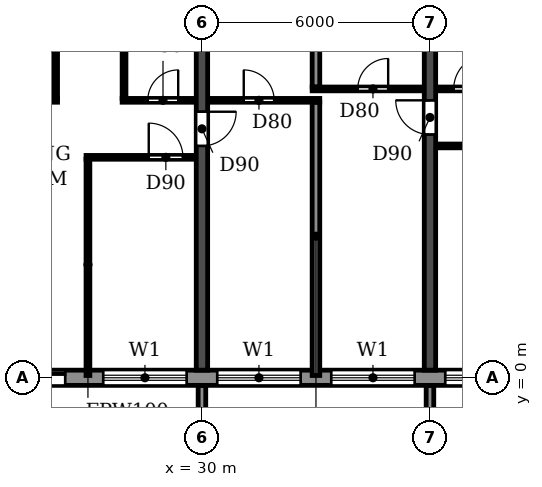
"""IFC4 building model, lengths in metres.
Left out: names, types, materials, properties, quantities, classifications, styles, units other than length and angle.
Written with IfcOpenShell. Run it as: python <this file> out.ifc"""

import sys

from ifc_helpers import new_model, si_unit, direction, frame, frame_2d, origin, place, context, subcontext, project, spatial, polyline, rectangle, outline, extrude, source, transform, mapped, element, fill, save


model = new_model("IFC4")
c1 = context("Model", 3, precision=1e-05, world=origin(), true_north=direction((0.0, 1.0)))
c2 = subcontext(c1, "Body", "Model", "MODEL_VIEW")
j1 = project(units=[si_unit("LENGTHUNIT", "METRE"), si_unit("PLANEANGLEUNIT", "RADIAN")], contexts=[c1])
p1 = place(None, origin())
s1 = spatial("IfcSite", under=j1, at=p1, CompositionType="ELEMENT")
p2 = place(p1, origin())
s2 = spatial("IfcBuilding", under=s1, at=p2, CompositionType="ELEMENT")
p3 = place(p2, frame((0.0, 0.0, 155.4)))
s3 = spatial("IfcBuildingStorey", under=s2, at=p3, CompositionType="ELEMENT", Elevation=155.4)
p4 = place(p3, frame((30.0, 0.2, 0.0), z_axis=(0.0, 0.0, 1.0), x_axis=(0.0, 1.0, 0.0)))
e1 = element("IfcWall", 1, at=p4, inside=s3, PredefinedType="SHEAR", context=c2, shape_type="SweptSolid", body=[
    extrude(rectangle(XDim=11.675, YDim=0.3, at=frame_2d((5.837, 0.0))), origin(), (0.0, 0.0, 1.0), 3.0),
])
p5 = place(p4, frame((5.9, 0.0, 0.0)))
e2 = element("IfcOpeningElement", 2, at=p5, cuts=e1, PredefinedType="OPENING", context=c2, shape_type="SweptSolid", body=[
    extrude(rectangle(XDim=0.9, YDim=2.1, at=frame_2d((0.45, 1.05))), frame((0.0, 0.16, 0.0), z_axis=(0.0, -1.0, 0.0), x_axis=(1.0, 0.0, 0.0)), (0.0, 0.0, 1.0), 0.32),
])
p6 = place(p3, frame((36.0, 0.2, 0.0), z_axis=(0.0, 0.0, 1.0), x_axis=(0.0, 1.0, 0.0)))
e3 = element("IfcWall", 3, at=p6, inside=s3, PredefinedType="SHEAR", context=c2, shape_type="SweptSolid", body=[
    extrude(rectangle(XDim=11.675, YDim=0.3, at=frame_2d((5.837, 0.0))), origin(), (0.0, 0.0, 1.0), 3.0),
])
p7 = place(p6, frame((6.2, 0.0, 0.0)))
e4 = element("IfcOpeningElement", 4, at=p7, cuts=e3, PredefinedType="OPENING", context=c2, shape_type="SweptSolid", body=[
    extrude(rectangle(XDim=0.9, YDim=2.1, at=frame_2d((0.45, 1.05))), frame((0.0, 0.16, 0.0), z_axis=(0.0, -1.0, 0.0), x_axis=(1.0, 0.0, 0.0)), (0.0, 0.0, 1.0), 0.32),
])
p8 = place(p3, frame((16.683, 0.0, 0.0), z_axis=(0.0, 0.0, 1.0), x_axis=(1.0, 0.0, 0.0)))
e5 = element("IfcWall", 5, at=p8, inside=s3, PredefinedType="STANDARD", context=c2, shape_type="SweptSolid", body=[
    extrude(rectangle(XDim=68.634, YDim=0.4, at=frame_2d((34.317, 0.0))), origin(), (0.0, 0.0, 1.0), 3.0),
])
p9 = place(p8, frame((1.717, 0.0, 0.9)))
e6 = element("IfcOpeningElement", 6, at=p9, cuts=e5, PredefinedType="OPENING", context=c2, shape_type="SweptSolid", body=[
    extrude(rectangle(XDim=2.2, YDim=1.5, at=frame_2d((1.1, 0.75))), frame((0.0, 0.21, 0.0), z_axis=(0.0, -1.0, 0.0), x_axis=(1.0, 0.0, 0.0)), (0.0, 0.0, 1.0), 0.42),
])
p10 = place(p8, frame((4.717, 0.0, 0.9)))
e7 = element("IfcOpeningElement", 7, at=p10, cuts=e5, PredefinedType="OPENING", context=c2, shape_type="SweptSolid", body=[
    extrude(rectangle(XDim=2.2, YDim=1.5, at=frame_2d((1.1, 0.75))), frame((0.0, 0.21, 0.0), z_axis=(0.0, -1.0, 0.0), x_axis=(1.0, 0.0, 0.0)), (0.0, 0.0, 1.0), 0.42),
])
p11 = place(p8, frame((7.917, 0.0, 0.0)))
e8 = element("IfcOpeningElement", 8, at=p11, cuts=e5, PredefinedType="OPENING", context=c2, shape_type="SweptSolid", body=[
    extrude(rectangle(XDim=1.8, YDim=2.4, at=frame_2d((0.9, 1.2))), frame((0.0, 0.21, 0.0), z_axis=(0.0, -1.0, 0.0), x_axis=(1.0, 0.0, 0.0)), (0.0, 0.0, 1.0), 0.42),
])
p12 = place(p8, frame((10.717, 0.0, 0.9)))
e9 = element("IfcOpeningElement", 9, at=p12, cuts=e5, PredefinedType="OPENING", context=c2, shape_type="SweptSolid", body=[
    extrude(rectangle(XDim=2.2, YDim=1.5, at=frame_2d((1.1, 0.75))), frame((0.0, 0.21, 0.0), z_axis=(0.0, -1.0, 0.0), x_axis=(1.0, 0.0, 0.0)), (0.0, 0.0, 1.0), 0.42),
])
p13 = place(p8, frame((13.717, 0.0, 0.9)))
e10 = element("IfcOpeningElement", 10, at=p13, cuts=e5, PredefinedType="OPENING", context=c2, shape_type="SweptSolid", body=[
    extrude(rectangle(XDim=2.2, YDim=1.5, at=frame_2d((1.1, 0.75))), frame((0.0, 0.21, 0.0), z_axis=(0.0, -1.0, 0.0), x_axis=(1.0, 0.0, 0.0)), (0.0, 0.0, 1.0), 0.42),
])
p14 = place(p8, frame((16.717, 0.0, 0.9)))
e11 = element("IfcOpeningElement", 11, at=p14, cuts=e5, PredefinedType="OPENING", context=c2, shape_type="SweptSolid", body=[
    extrude(rectangle(XDim=2.2, YDim=1.5, at=frame_2d((1.1, 0.75))), frame((0.0, 0.21, 0.0), z_axis=(0.0, -1.0, 0.0), x_axis=(1.0, 0.0, 0.0)), (0.0, 0.0, 1.0), 0.42),
])
p15 = place(p8, frame((19.717, 0.0, 0.9)))
e12 = element("IfcOpeningElement", 12, at=p15, cuts=e5, PredefinedType="OPENING", context=c2, shape_type="SweptSolid", body=[
    extrude(rectangle(XDim=2.2, YDim=1.5, at=frame_2d((1.1, 0.75))), frame((0.0, 0.21, 0.0), z_axis=(0.0, -1.0, 0.0), x_axis=(1.0, 0.0, 0.0)), (0.0, 0.0, 1.0), 0.42),
])
p16 = place(p8, frame((22.917, 0.0, 0.0)))
e13 = element("IfcOpeningElement", 13, at=p16, cuts=e5, PredefinedType="OPENING", context=c2, shape_type="SweptSolid", body=[
    extrude(rectangle(XDim=1.8, YDim=2.4, at=frame_2d((0.9, 1.2))), frame((0.0, 0.21, 0.0), z_axis=(0.0, -1.0, 0.0), x_axis=(1.0, 0.0, 0.0)), (0.0, 0.0, 1.0), 0.42),
])
p17 = place(p8, frame((25.717, 0.0, 0.9)))
e14 = element("IfcOpeningElement", 14, at=p17, cuts=e5, PredefinedType="OPENING", context=c2, shape_type="SweptSolid", body=[
    extrude(rectangle(XDim=2.2, YDim=1.5, at=frame_2d((1.1, 0.75))), frame((0.0, 0.21, 0.0), z_axis=(0.0, -1.0, 0.0), x_axis=(1.0, 0.0, 0.0)), (0.0, 0.0, 1.0), 0.42),
])
p18 = place(p8, frame((28.717, 0.0, 0.9)))
e15 = element("IfcOpeningElement", 15, at=p18, cuts=e5, PredefinedType="OPENING", context=c2, shape_type="SweptSolid", body=[
    extrude(rectangle(XDim=2.2, YDim=1.5, at=frame_2d((1.1, 0.75))), frame((0.0, 0.21, 0.0), z_axis=(0.0, -1.0, 0.0), x_axis=(1.0, 0.0, 0.0)), (0.0, 0.0, 1.0), 0.42),
])
p19 = place(p8, frame((31.917, 0.0, 0.0)))
e16 = element("IfcOpeningElement", 16, at=p19, cuts=e5, PredefinedType="OPENING", context=c2, shape_type="SweptSolid", body=[
    extrude(rectangle(XDim=1.8, YDim=2.4, at=frame_2d((0.9, 1.2))), frame((0.0, 0.21, 0.0), z_axis=(0.0, -1.0, 0.0), x_axis=(1.0, 0.0, 0.0)), (0.0, 0.0, 1.0), 0.42),
])
p20 = place(p8, frame((34.717, 0.0, 0.9)))
e17 = element("IfcOpeningElement", 17, at=p20, cuts=e5, PredefinedType="OPENING", context=c2, shape_type="SweptSolid", body=[
    extrude(rectangle(XDim=2.2, YDim=1.5, at=frame_2d((1.1, 0.75))), frame((0.0, 0.21, 0.0), z_axis=(0.0, -1.0, 0.0), x_axis=(1.0, 0.0, 0.0)), (0.0, 0.0, 1.0), 0.42),
])
p21 = place(p8, frame((37.717, 0.0, 0.9)))
e18 = element("IfcOpeningElement", 18, at=p21, cuts=e5, PredefinedType="OPENING", context=c2, shape_type="SweptSolid", body=[
    extrude(rectangle(XDim=2.2, YDim=1.5, at=frame_2d((1.1, 0.75))), frame((0.0, 0.21, 0.0), z_axis=(0.0, -1.0, 0.0), x_axis=(1.0, 0.0, 0.0)), (0.0, 0.0, 1.0), 0.42),
])
p22 = place(p8, frame((40.717, 0.0, 0.9)))
e19 = element("IfcOpeningElement", 19, at=p22, cuts=e5, PredefinedType="OPENING", context=c2, shape_type="SweptSolid", body=[
    extrude(rectangle(XDim=2.2, YDim=1.5, at=frame_2d((1.1, 0.75))), frame((0.0, 0.21, 0.0), z_axis=(0.0, -1.0, 0.0), x_axis=(1.0, 0.0, 0.0)), (0.0, 0.0, 1.0), 0.42),
])
p23 = place(p8, frame((43.717, 0.0, 0.9)))
e20 = element("IfcOpeningElement", 20, at=p23, cuts=e5, PredefinedType="OPENING", context=c2, shape_type="SweptSolid", body=[
    extrude(rectangle(XDim=2.2, YDim=1.5, at=frame_2d((1.1, 0.75))), frame((0.0, 0.21, 0.0), z_axis=(0.0, -1.0, 0.0), x_axis=(1.0, 0.0, 0.0)), (0.0, 0.0, 1.0), 0.42),
])
p24 = place(p8, frame((46.917, 0.0, 0.0)))
e21 = element("IfcOpeningElement", 21, at=p24, cuts=e5, PredefinedType="OPENING", context=c2, shape_type="SweptSolid", body=[
    extrude(rectangle(XDim=1.8, YDim=2.4, at=frame_2d((0.9, 1.2))), frame((0.0, 0.21, 0.0), z_axis=(0.0, -1.0, 0.0), x_axis=(1.0, 0.0, 0.0)), (0.0, 0.0, 1.0), 0.42),
])
p25 = place(p8, frame((49.717, 0.0, 0.9)))
e22 = element("IfcOpeningElement", 22, at=p25, cuts=e5, PredefinedType="OPENING", context=c2, shape_type="SweptSolid", body=[
    extrude(rectangle(XDim=2.2, YDim=1.5, at=frame_2d((1.1, 0.75))), frame((0.0, 0.21, 0.0), z_axis=(0.0, -1.0, 0.0), x_axis=(1.0, 0.0, 0.0)), (0.0, 0.0, 1.0), 0.42),
])
p26 = place(p8, frame((52.717, 0.0, 0.9)))
e23 = element("IfcOpeningElement", 23, at=p26, cuts=e5, PredefinedType="OPENING", context=c2, shape_type="SweptSolid", body=[
    extrude(rectangle(XDim=2.2, YDim=1.5, at=frame_2d((1.1, 0.75))), frame((0.0, 0.21, 0.0), z_axis=(0.0, -1.0, 0.0), x_axis=(1.0, 0.0, 0.0)), (0.0, 0.0, 1.0), 0.42),
])
p27 = place(p8, frame((55.717, 0.0, 0.9)))
e24 = element("IfcOpeningElement", 24, at=p27, cuts=e5, PredefinedType="OPENING", context=c2, shape_type="SweptSolid", body=[
    extrude(rectangle(XDim=2.2, YDim=1.5, at=frame_2d((1.1, 0.75))), frame((0.0, 0.21, 0.0), z_axis=(0.0, -1.0, 0.0), x_axis=(1.0, 0.0, 0.0)), (0.0, 0.0, 1.0), 0.42),
])
p28 = place(p8, frame((58.917, 0.0, 0.0)))
e25 = element("IfcOpeningElement", 25, at=p28, cuts=e5, PredefinedType="OPENING", context=c2, shape_type="SweptSolid", body=[
    extrude(rectangle(XDim=1.8, YDim=2.4, at=frame_2d((0.9, 1.2))), frame((0.0, 0.21, 0.0), z_axis=(0.0, -1.0, 0.0), x_axis=(1.0, 0.0, 0.0)), (0.0, 0.0, 1.0), 0.42),
])
p29 = place(p8, frame((61.717, 0.0, 0.9)))
e26 = element("IfcOpeningElement", 26, at=p29, cuts=e5, PredefinedType="OPENING", context=c2, shape_type="SweptSolid", body=[
    extrude(rectangle(XDim=2.2, YDim=1.5, at=frame_2d((1.1, 0.75))), frame((0.0, 0.21, 0.0), z_axis=(0.0, -1.0, 0.0), x_axis=(1.0, 0.0, 0.0)), (0.0, 0.0, 1.0), 0.42),
])
p30 = place(p8, frame((64.717, 0.0, 0.9)))
e27 = element("IfcOpeningElement", 27, at=p30, cuts=e5, PredefinedType="OPENING", context=c2, shape_type="SweptSolid", body=[
    extrude(rectangle(XDim=2.2, YDim=1.5, at=frame_2d((1.1, 0.75))), frame((0.0, 0.21, 0.0), z_axis=(0.0, -1.0, 0.0), x_axis=(1.0, 0.0, 0.0)), (0.0, 0.0, 1.0), 0.42),
])
m1 = source(origin(), c2, "Body", "SweptSolid", [
    extrude(outline(polyline([(0.0, 0.0), (0.2, 0.0), (0.2, 1.65), (0.0, 1.65), (0.0, 0.0)])), origin(), (0.0, 0.0, 1.0), 3.1),
])
for number, where in (
    (28, (29.9, -1.85, 0.0)),
    (29, (35.9, -1.85, 0.0)),
):
    element("IfcWall", number, at=place(p3, frame(where)), inside=s3, PredefinedType="STANDARD", context=c2, shape_type="MappedRepresentation", body=[
        mapped(m1, transform((0.0, 0.0, 0.0))),
    ])
p31 = place(p3, frame((33.0, 0.06, 0.0), z_axis=(0.0, 0.0, 1.0), x_axis=(0.0, 1.0, 0.0)))
e30 = element("IfcWall", 30, at=p31, inside=s3, PredefinedType="PARTITIONING", context=c2, shape_type="SweptSolid", body=[
    extrude(rectangle(XDim=7.19, YDim=0.2, at=frame_2d((3.595, 0.0))), origin(), (0.0, 0.0, 1.0), 3.0),
])
p32 = place(p3, frame((33.0, 7.65, 0.0), z_axis=(0.0, 0.0, 1.0), x_axis=(0.0, 1.0, 0.0)))
e31 = element("IfcWall", 31, at=p32, inside=s3, PredefinedType="PARTITIONING", context=c2, shape_type="SweptSolid", body=[
    extrude(rectangle(XDim=4.215, YDim=0.2, at=frame_2d((2.107, 0.0))), origin(), (0.0, 0.0, 1.0), 3.0),
])
p33 = place(p3, frame((26.95, 5.8, 0.0), z_axis=(0.0, 0.0, 1.0), x_axis=(1.0, 0.0, 0.0)))
e32 = element("IfcWall", 32, at=p33, inside=s3, PredefinedType="PARTITIONING", context=c2, shape_type="SweptSolid", body=[
    extrude(rectangle(XDim=2.89, YDim=0.1, at=frame_2d((1.445, 0.0))), origin(), (0.0, 0.0, 1.0), 3.0),
])
p34 = place(p33, frame((1.65, 0.0, 0.0)))
e33 = element("IfcOpeningElement", 33, at=p34, cuts=e32, PredefinedType="OPENING", context=c2, shape_type="SweptSolid", body=[
    extrude(rectangle(XDim=0.9, YDim=2.1, at=frame_2d((0.45, 1.05))), frame((0.0, 0.06, 0.0), z_axis=(0.0, -1.0, 0.0), x_axis=(1.0, 0.0, 0.0)), (0.0, 0.0, 1.0), 0.12),
])
p35 = place(p3, frame((36.16, 6.1, 0.0), z_axis=(0.0, 0.0, 1.0), x_axis=(1.0, 0.0, 0.0)))
e34 = element("IfcWall", 34, at=p35, inside=s3, PredefinedType="PARTITIONING", context=c2, shape_type="SweptSolid", body=[
    extrude(rectangle(XDim=2.89, YDim=0.1, at=frame_2d((1.445, 0.0))), origin(), (0.0, 0.0, 1.0), 3.0),
])
p36 = place(p35, frame((1.44, 0.0, 0.0)))
e35 = element("IfcOpeningElement", 35, at=p36, cuts=e34, PredefinedType="OPENING", context=c2, shape_type="SweptSolid", body=[
    extrude(rectangle(XDim=0.9, YDim=2.1, at=frame_2d((0.45, 1.05))), frame((0.0, 0.06, 0.0), z_axis=(0.0, -1.0, 0.0), x_axis=(1.0, 0.0, 0.0)), (0.0, 0.0, 1.0), 0.12),
])
p37 = place(p3, frame((24.16, 7.3, 0.0), z_axis=(0.0, 0.0, 1.0), x_axis=(1.0, 0.0, 0.0)))
e36 = element("IfcWall", 36, at=p37, inside=s3, PredefinedType="PARTITIONING", context=c2, shape_type="SweptSolid", body=[
    extrude(rectangle(XDim=2.04, YDim=0.1, at=frame_2d((1.02, 0.0))), origin(), (0.0, 0.0, 1.0), 3.0),
])
p38 = place(p37, frame((0.465, 0.0, 0.0)))
e37 = element("IfcOpeningElement", 37, at=p38, cuts=e36, PredefinedType="OPENING", context=c2, shape_type="SweptSolid", body=[
    extrude(rectangle(XDim=0.9, YDim=2.1, at=frame_2d((0.45, 1.05))), frame((0.0, 0.06, 0.0), z_axis=(0.0, -1.0, 0.0), x_axis=(1.0, 0.0, 0.0)), (0.0, 0.0, 1.0), 0.12),
])
p39 = place(p3, frame((27.9, 7.3, 0.0), z_axis=(0.0, 0.0, 1.0), x_axis=(1.0, 0.0, 0.0)))
e38 = element("IfcWall", 38, at=p39, inside=s3, PredefinedType="PARTITIONING", context=c2, shape_type="SweptSolid", body=[
    extrude(rectangle(XDim=1.94, YDim=0.1, at=frame_2d((0.97, 0.0))), origin(), (0.0, 0.0, 1.0), 3.0),
])
p40 = place(p39, frame((0.675, 0.0, 0.0)))
e39 = element("IfcOpeningElement", 39, at=p40, cuts=e38, PredefinedType="OPENING", context=c2, shape_type="SweptSolid", body=[
    extrude(rectangle(XDim=0.8, YDim=2.1, at=frame_2d((0.4, 1.05))), frame((0.0, 0.06, 0.0), z_axis=(0.0, -1.0, 0.0), x_axis=(1.0, 0.0, 0.0)), (0.0, 0.0, 1.0), 0.12),
])
p41 = place(p3, frame((30.16, 7.3, 0.0), z_axis=(0.0, 0.0, 1.0), x_axis=(1.0, 0.0, 0.0)))
e40 = element("IfcWall", 40, at=p41, inside=s3, PredefinedType="PARTITIONING", context=c2, shape_type="SweptSolid", body=[
    extrude(rectangle(XDim=2.94, YDim=0.1, at=frame_2d((1.47, 0.0))), origin(), (0.0, 0.0, 1.0), 3.0),
])
p42 = place(p41, frame((0.94, 0.0, 0.0)))
e41 = element("IfcOpeningElement", 41, at=p42, cuts=e40, PredefinedType="OPENING", context=c2, shape_type="SweptSolid", body=[
    extrude(rectangle(XDim=0.8, YDim=2.1, at=frame_2d((0.4, 1.05))), frame((0.0, 0.06, 0.0), z_axis=(0.0, -1.0, 0.0), x_axis=(1.0, 0.0, 0.0)), (0.0, 0.0, 1.0), 0.12),
])
p43 = place(p3, frame((32.9, 7.6, 0.0), z_axis=(0.0, 0.0, 1.0), x_axis=(1.0, 0.0, 0.0)))
e42 = element("IfcWall", 42, at=p43, inside=s3, PredefinedType="PARTITIONING", context=c2, shape_type="SweptSolid", body=[
    extrude(rectangle(XDim=2.94, YDim=0.1, at=frame_2d((1.47, 0.0))), origin(), (0.0, 0.0, 1.0), 3.0),
])
p44 = place(p43, frame((1.2, 0.0, 0.0)))
e43 = element("IfcOpeningElement", 43, at=p44, cuts=e42, PredefinedType="OPENING", context=c2, shape_type="SweptSolid", body=[
    extrude(rectangle(XDim=0.8, YDim=2.1, at=frame_2d((0.4, 1.05))), frame((0.0, 0.06, 0.0), z_axis=(0.0, -1.0, 0.0), x_axis=(1.0, 0.0, 0.0)), (0.0, 0.0, 1.0), 0.12),
])
p45 = place(p3, frame((36.16, 7.6, 0.0), z_axis=(0.0, 0.0, 1.0), x_axis=(1.0, 0.0, 0.0)))
e44 = element("IfcWall", 44, at=p45, inside=s3, PredefinedType="PARTITIONING", context=c2, shape_type="SweptSolid", body=[
    extrude(rectangle(XDim=2.04, YDim=0.1, at=frame_2d((1.02, 0.0))), origin(), (0.0, 0.0, 1.0), 3.0),
])
p46 = place(p45, frame((0.465, 0.0, 0.0)))
e45 = element("IfcOpeningElement", 45, at=p46, cuts=e44, PredefinedType="OPENING", context=c2, shape_type="SweptSolid", body=[
    extrude(rectangle(XDim=0.9, YDim=2.1, at=frame_2d((0.45, 1.05))), frame((0.0, 0.06, 0.0), z_axis=(0.0, -1.0, 0.0), x_axis=(1.0, 0.0, 0.0)), (0.0, 0.0, 1.0), 0.12),
])
p47 = place(p3, frame((26.15, 7.35, 0.0), z_axis=(0.0, 0.0, 1.0), x_axis=(0.0, 1.0, 0.0)))
e46 = element("IfcWall", 46, at=p47, inside=s3, PredefinedType="PARTITIONING", context=c2, shape_type="SweptSolid", body=[
    extrude(rectangle(XDim=4.515, YDim=0.1, at=frame_2d((2.257, 0.0))), origin(), (0.0, 0.0, 1.0), 3.0),
])
p48 = place(p3, frame((27.0, 0.06, 0.0), z_axis=(0.0, 0.0, 1.0), x_axis=(0.0, 1.0, 0.0)))
e47 = element("IfcWall", 47, at=p48, inside=s3, PredefinedType="PARTITIONING", context=c2, shape_type="SweptSolid", body=[
    extrude(rectangle(XDim=5.69, YDim=0.1, at=frame_2d((2.845, 0.0))), origin(), (0.0, 0.0, 1.0), 3.0),
])
p49 = place(p3, frame((27.95, 7.35, 0.0), z_axis=(0.0, 0.0, 1.0), x_axis=(0.0, 1.0, 0.0)))
e48 = element("IfcWall", 48, at=p49, inside=s3, PredefinedType="PARTITIONING", context=c2, shape_type="SweptSolid", body=[
    extrude(rectangle(XDim=4.515, YDim=0.1, at=frame_2d((2.257, 0.0))), origin(), (0.0, 0.0, 1.0), 3.0),
])
p50 = place(p11, origin())
e49 = element("IfcDoor", 49, at=p50, inside=s3, OperationType="DOUBLE_DOOR_SLIDING", PredefinedType="DOOR", context=c2, shape_type="SweptSolid", body=[
    extrude(rectangle(XDim=1.8, YDim=2.4, at=frame_2d((0.9, 1.2))), frame((0.0, 0.025, 0.0), z_axis=(0.0, -1.0, 0.0), x_axis=(1.0, 0.0, 0.0)), (0.0, 0.0, 1.0), 0.05),
])
fill(e8, e49)
p51 = place(p12, origin())
e50 = element("IfcWindow", 50, at=p51, inside=s3, PartitioningType="DOUBLE_PANEL_HORIZONTAL", PredefinedType="WINDOW", context=c2, shape_type="SweptSolid", body=[
    extrude(rectangle(XDim=2.2, YDim=1.5, at=frame_2d((1.1, 0.75))), frame((0.0, 0.03, 0.0), z_axis=(0.0, -1.0, 0.0), x_axis=(1.0, 0.0, 0.0)), (0.0, 0.0, 1.0), 0.06),
])
fill(e9, e50)
p52 = place(p13, origin())
e51 = element("IfcWindow", 51, at=p52, inside=s3, PartitioningType="DOUBLE_PANEL_HORIZONTAL", PredefinedType="WINDOW", context=c2, shape_type="SweptSolid", body=[
    extrude(rectangle(XDim=2.2, YDim=1.5, at=frame_2d((1.1, 0.75))), frame((0.0, 0.03, 0.0), z_axis=(0.0, -1.0, 0.0), x_axis=(1.0, 0.0, 0.0)), (0.0, 0.0, 1.0), 0.06),
])
fill(e10, e51)
p53 = place(p14, origin())
e52 = element("IfcWindow", 52, at=p53, inside=s3, PartitioningType="DOUBLE_PANEL_HORIZONTAL", PredefinedType="WINDOW", context=c2, shape_type="SweptSolid", body=[
    extrude(rectangle(XDim=2.2, YDim=1.5, at=frame_2d((1.1, 0.75))), frame((0.0, 0.03, 0.0), z_axis=(0.0, -1.0, 0.0), x_axis=(1.0, 0.0, 0.0)), (0.0, 0.0, 1.0), 0.06),
])
fill(e11, e52)
p54 = place(p15, origin())
e53 = element("IfcWindow", 53, at=p54, inside=s3, PartitioningType="DOUBLE_PANEL_HORIZONTAL", PredefinedType="WINDOW", context=c2, shape_type="SweptSolid", body=[
    extrude(rectangle(XDim=2.2, YDim=1.5, at=frame_2d((1.1, 0.75))), frame((0.0, 0.03, 0.0), z_axis=(0.0, -1.0, 0.0), x_axis=(1.0, 0.0, 0.0)), (0.0, 0.0, 1.0), 0.06),
])
fill(e12, e53)
p55 = place(p42, origin())
e54 = element("IfcDoor", 54, at=p55, inside=s3, OperationType="SINGLE_SWING_LEFT", PredefinedType="DOOR", context=c2, shape_type="SweptSolid", body=[
    extrude(rectangle(XDim=0.8, YDim=2.1, at=frame_2d((0.4, 1.05))), frame((0.0, 0.025, 0.0), z_axis=(0.0, -1.0, 0.0), x_axis=(1.0, 0.0, 0.0)), (0.0, 0.0, 1.0), 0.05),
])
fill(e41, e54)
p56 = place(p40, origin())
e55 = element("IfcDoor", 55, at=p56, inside=s3, OperationType="SINGLE_SWING_RIGHT", PredefinedType="DOOR", context=c2, shape_type="SweptSolid", body=[
    extrude(rectangle(XDim=0.8, YDim=2.1, at=frame_2d((0.4, 1.05))), frame((0.0, 0.025, 0.0), z_axis=(0.0, -1.0, 0.0), x_axis=(1.0, 0.0, 0.0)), (0.0, 0.0, 1.0), 0.05),
])
fill(e39, e55)
p57 = place(p34, origin())
e56 = element("IfcDoor", 56, at=p57, inside=s3, OperationType="SINGLE_SWING_LEFT", PredefinedType="DOOR", context=c2, shape_type="SweptSolid", body=[
    extrude(rectangle(XDim=0.9, YDim=2.1, at=frame_2d((0.45, 1.05))), frame((0.0, 0.025, 0.0), z_axis=(0.0, -1.0, 0.0), x_axis=(1.0, 0.0, 0.0)), (0.0, 0.0, 1.0), 0.05),
])
fill(e33, e56)
p58 = place(p5, frame((0.9, 0.0, 0.0), z_axis=(0.0, 0.0, 1.0), x_axis=(-1.0, 0.0, 0.0)))
e57 = element("IfcDoor", 57, at=p58, inside=s3, OperationType="SINGLE_SWING_LEFT", PredefinedType="DOOR", context=c2, shape_type="SweptSolid", body=[
    extrude(rectangle(XDim=0.9, YDim=2.1, at=frame_2d((0.45, 1.05))), frame((0.0, 0.025, 0.0), z_axis=(0.0, -1.0, 0.0), x_axis=(1.0, 0.0, 0.0)), (0.0, 0.0, 1.0), 0.05),
])
fill(e2, e57)
p59 = place(p44, origin())
e58 = element("IfcDoor", 58, at=p59, inside=s3, OperationType="SINGLE_SWING_RIGHT", PredefinedType="DOOR", context=c2, shape_type="SweptSolid", body=[
    extrude(rectangle(XDim=0.8, YDim=2.1, at=frame_2d((0.4, 1.05))), frame((0.0, 0.025, 0.0), z_axis=(0.0, -1.0, 0.0), x_axis=(1.0, 0.0, 0.0)), (0.0, 0.0, 1.0), 0.05),
])
fill(e43, e58)
p60 = place(p7, origin())
e59 = element("IfcDoor", 59, at=p60, inside=s3, OperationType="SINGLE_SWING_RIGHT", PredefinedType="DOOR", context=c2, shape_type="SweptSolid", body=[
    extrude(rectangle(XDim=0.9, YDim=2.1, at=frame_2d((0.45, 1.05))), frame((0.0, 0.025, 0.0), z_axis=(0.0, -1.0, 0.0), x_axis=(1.0, 0.0, 0.0)), (0.0, 0.0, 1.0), 0.05),
])
fill(e4, e59)
p61 = place(p46, origin())
e60 = element("IfcDoor", 60, at=p61, inside=s3, OperationType="SINGLE_SWING_RIGHT", PredefinedType="DOOR", context=c2, shape_type="SweptSolid", body=[
    extrude(rectangle(XDim=0.9, YDim=2.1, at=frame_2d((0.45, 1.05))), frame((0.0, 0.025, 0.0), z_axis=(0.0, -1.0, 0.0), x_axis=(1.0, 0.0, 0.0)), (0.0, 0.0, 1.0), 0.05),
])
fill(e45, e60)
save(model, sys.argv[1])
